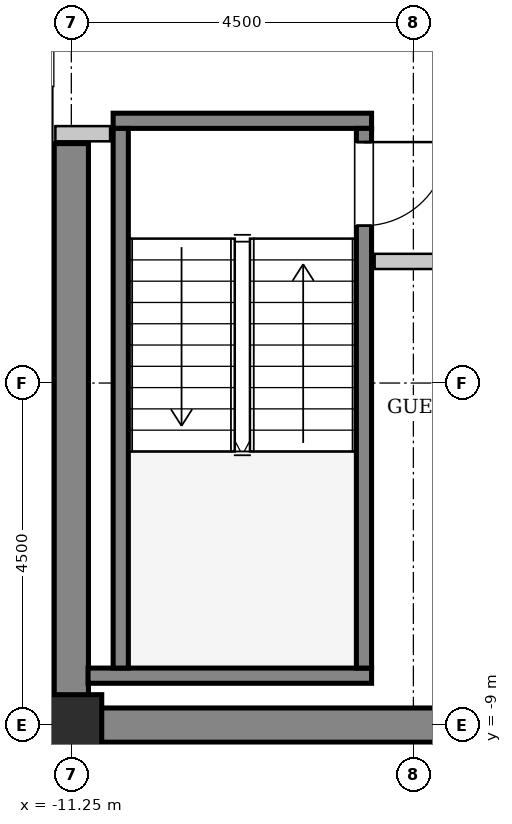
"""IFC4 building model, lengths in metres.
Left out: names, types, materials, properties, quantities, classifications, styles, units other than length and angle.
Written with IfcOpenShell. Run it as: python <this file> out.ifc"""

import sys

from ifc_helpers import new_model, si_unit, direction, frame, frame_2d, origin, origin_2d, place, context, subcontext, project, spatial, rectangle, hollow_rectangle, extrude, source, transform, mapped, element, fill, save


model = new_model("IFC4")
c1 = context("Model", 3, precision=1e-05, world=origin(), true_north=direction((0.0, 1.0)))
c2 = subcontext(c1, "Body", "Model", "MODEL_VIEW")
j1 = project(units=[si_unit("LENGTHUNIT", "METRE"), si_unit("PLANEANGLEUNIT", "RADIAN")], contexts=[c1])
p1 = place(None, origin())
s1 = spatial("IfcSite", under=j1, at=p1, CompositionType="ELEMENT")
p2 = place(p1, origin())
s2 = spatial("IfcBuilding", under=s1, at=p2, CompositionType="ELEMENT")
p3 = place(p2, frame((0.0, 0.0, 206.6)))
s3 = spatial("IfcBuildingStorey", under=s2, at=p3, CompositionType="ELEMENT", Elevation=206.6)
m1 = source(origin(), c2, "Body", "SweptSolid", [
    extrude(rectangle(XDim=9.925, YDim=0.45, at=frame_2d((4.962, 0.0))), origin(), (0.0, 0.0, 1.0), 3.8),
])
p4 = place(p3, frame((-11.475, -9.0, 0.0), z_axis=(0.0, 0.0, 1.0), x_axis=(1.0, 0.0, 0.0)))
e1 = element("IfcWall", 1, at=p4, inside=s3, PredefinedType="SHEAR", context=c2, shape_type="MappedRepresentation", body=[
    mapped(m1, transform((0.0, 0.0, 0.0), x_axis=(1.0, 0.0, 0.0), y_axis=(0.0, 1.0, 0.0), z_axis=(0.0, 0.0, 1.0), scale=1.0)),
])
m2 = source(origin(), c2, "Body", "SweptSolid", [
    extrude(rectangle(XDim=7.425, YDim=0.45, at=frame_2d((3.712, 0.0))), origin(), (0.0, 0.0, 1.0), 3.8),
])
p5 = place(p3, frame((-11.25, -8.775, 0.0), z_axis=(0.0, 0.0, 1.0), x_axis=(0.0, 1.0, 0.0)))
e2 = element("IfcWall", 2, at=p5, inside=s3, PredefinedType="SHEAR", context=c2, shape_type="MappedRepresentation", body=[
    mapped(m2, transform((0.0, 0.0, 0.0), x_axis=(1.0, 0.0, 0.0), y_axis=(0.0, 1.0, 0.0), z_axis=(0.0, 0.0, 1.0), scale=1.0)),
])
m3 = source(origin(), c2, "Body", "SweptSolid", [
    extrude(hollow_rectangle(XDim=0.8, YDim=0.8, WallThickness=0.04, InnerFilletRadius=0.04, OuterFilletRadius=0.08, at=origin_2d()), origin(), (0.0, 0.0, 1.0), 3.8),
])
p6 = place(p3, frame((-11.25, -9.0, 0.0), z_axis=(0.0, 0.0, 1.0), x_axis=(1.0, 0.0, 0.0)))
e3 = element("IfcColumn", 3, at=p6, inside=s3, PredefinedType="COLUMN", context=c2, shape_type="MappedRepresentation", body=[
    mapped(m3, transform((0.0, 0.0, 0.0), x_axis=(1.0, 0.0, 0.0), y_axis=(0.0, 1.0, 0.0), z_axis=(0.0, 0.0, 1.0), scale=1.0)),
])
m4 = source(origin(), c2, "Body", "SweptSolid", [
    extrude(rectangle(XDim=3.4, YDim=0.2, at=frame_2d((1.7, 0.0))), origin(), (0.0, 0.0, 1.0), 3.8),
])
p7 = place(p3, frame((-10.7, -1.05, 0.0), z_axis=(0.0, 0.0, 1.0), x_axis=(1.0, 0.0, 0.0)))
e4 = element("IfcWall", 4, at=p7, inside=s3, PredefinedType="SOLIDWALL", context=c2, shape_type="MappedRepresentation", body=[
    mapped(m4, transform((0.0, 0.0, 0.0), x_axis=(1.0, 0.0, 0.0), y_axis=(0.0, 1.0, 0.0), z_axis=(0.0, 0.0, 1.0), scale=1.0)),
])
m5 = source(origin(), c2, "Body", "SweptSolid", [
    extrude(rectangle(XDim=3.73, YDim=0.2, at=frame_2d((1.865, 0.0))), origin(), (0.0, 0.0, 1.0), 3.8),
])
p8 = place(p3, frame((-11.03, -8.35, 0.0), z_axis=(0.0, 0.0, 1.0), x_axis=(1.0, 0.0, 0.0)))
e5 = element("IfcWall", 5, at=p8, inside=s3, PredefinedType="SOLIDWALL", context=c2, shape_type="MappedRepresentation", body=[
    mapped(m5, transform((0.0, 0.0, 0.0), x_axis=(1.0, 0.0, 0.0), y_axis=(0.0, 1.0, 0.0), z_axis=(0.0, 0.0, 1.0), scale=1.0)),
])
m6 = source(origin(), c2, "Body", "SweptSolid", [
    extrude(rectangle(XDim=7.1, YDim=0.2, at=frame_2d((3.55, 0.0))), origin(), (0.0, 0.0, 1.0), 3.8),
])
p9 = place(p3, frame((-10.6, -1.15, 0.0), z_axis=(0.0, 0.0, 1.0), x_axis=(0.0, -1.0, 0.0)))
e6 = element("IfcWall", 6, at=p9, inside=s3, PredefinedType="SOLIDWALL", context=c2, shape_type="MappedRepresentation", body=[
    mapped(m6, transform((0.0, 0.0, 0.0), x_axis=(1.0, 0.0, 0.0), y_axis=(0.0, 1.0, 0.0), z_axis=(0.0, 0.0, 1.0), scale=1.0)),
])
p10 = place(p3, frame((-7.4, -1.15, 0.0), z_axis=(0.0, 0.0, 1.0), x_axis=(0.0, -1.0, 0.0)))
e7 = element("IfcWall", 7, at=p10, inside=s3, PredefinedType="SOLIDWALL", context=c2, shape_type="MappedRepresentation", body=[
    mapped(m6, transform((0.0, 0.0, 0.0), x_axis=(1.0, 0.0, 0.0), y_axis=(0.0, 1.0, 0.0), z_axis=(0.0, 0.0, 1.0), scale=1.0)),
])
p11 = place(p10, frame((0.18, 0.0, 0.0)))
e8 = element("IfcOpeningElement", 8, at=p11, cuts=e7, PredefinedType="OPENING", context=c2, shape_type="SweptSolid", body=[
    extrude(rectangle(XDim=1.1, YDim=2.15, at=frame_2d((0.55, 1.075))), frame((0.0, 0.11, 0.0), z_axis=(0.0, -1.0, 0.0), x_axis=(1.0, 0.0, 0.0)), (0.0, 0.0, 1.0), 0.22),
])
m7 = source(origin(), c2, "Body", "SweptSolid", [
    extrude(rectangle(XDim=2.9, YDim=0.2, at=frame_2d((1.45, 0.0))), origin(), (0.0, 0.0, 1.0), 3.535),
])
p12 = place(p3, frame((-7.26, -2.9, 0.0), z_axis=(0.0, 0.0, 1.0), x_axis=(1.0, 0.0, 0.0)))
e9 = element("IfcWall", 9, at=p12, inside=s3, PredefinedType="PARTITIONING", context=c2, shape_type="MappedRepresentation", body=[
    mapped(m7, transform((0.0, 0.0, 0.0), x_axis=(1.0, 0.0, 0.0), y_axis=(0.0, 1.0, 0.0), z_axis=(0.0, 0.0, 1.0), scale=1.0)),
])
m8 = source(origin(), c2, "Body", "SweptSolid", [
    extrude(rectangle(XDim=0.72, YDim=0.2, at=frame_2d((0.36, 0.0))), origin(), (0.0, 0.0, 1.0), 3.535),
])
p13 = place(p3, frame((-11.46, -1.22, 0.0), z_axis=(0.0, 0.0, 1.0), x_axis=(1.0, 0.0, 0.0)))
e10 = element("IfcWall", 10, at=p13, inside=s3, PredefinedType="PARTITIONING", context=c2, shape_type="MappedRepresentation", body=[
    mapped(m8, transform((0.0, 0.0, 0.0), x_axis=(1.0, 0.0, 0.0), y_axis=(0.0, 1.0, 0.0), z_axis=(0.0, 0.0, 1.0), scale=1.0)),
])
m9 = source(origin(), c2, "Body", "SweptSolid", [
    extrude(rectangle(XDim=1.1, YDim=2.15, at=frame_2d((0.55, 1.075))), frame((0.0, 0.025, 0.0), z_axis=(0.0, -1.0, 0.0), x_axis=(1.0, 0.0, 0.0)), (0.0, 0.0, 1.0), 0.05),
])
p14 = place(p11, origin())
e11 = element("IfcDoor", 11, at=p14, inside=s3, OperationType="SINGLE_SWING_LEFT", PredefinedType="DOOR", context=c2, shape_type="MappedRepresentation", body=[
    mapped(m9, transform((0.0, 0.0, 0.0), x_axis=(1.0, 0.0, 0.0), y_axis=(0.0, 1.0, 0.0), z_axis=(0.0, 0.0, 1.0), scale=1.0)),
])
fill(e8, e11)
save(model, sys.argv[1])
